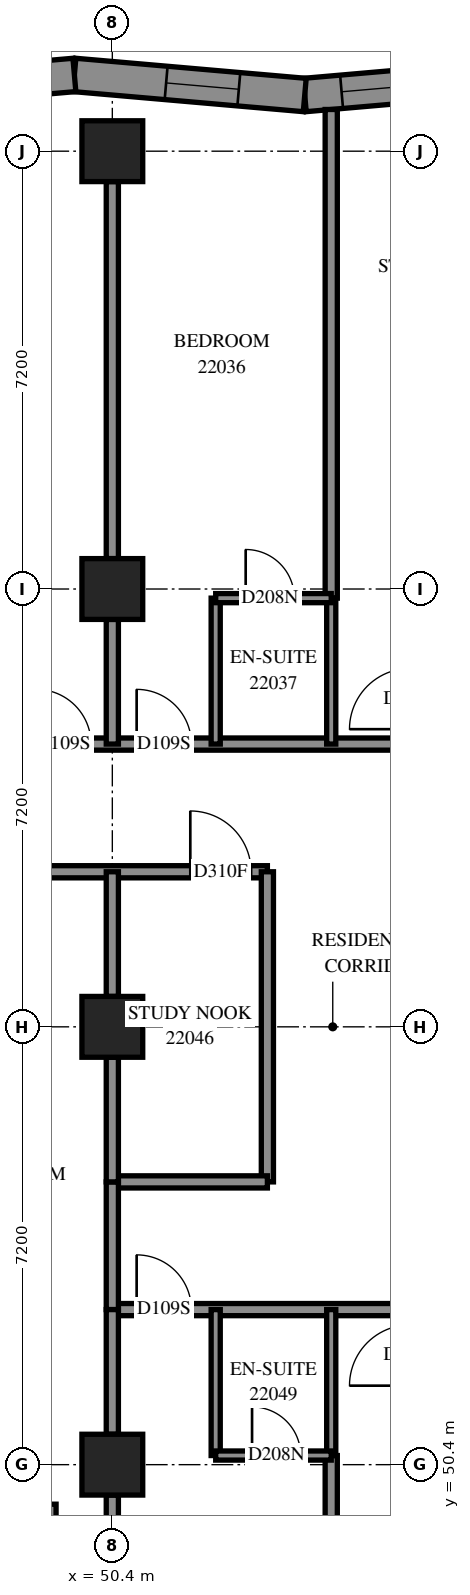
"""IFC4 building model, lengths in metres.
Left out: names, types, materials, properties, quantities, classifications, styles, units other than length and angle.
Written with IfcOpenShell. Run it as: python <this file> out.ifc"""

import sys

from ifc_helpers import new_model, si_unit, direction, frame, frame_2d, origin, origin_2d, place, context, subcontext, project, spatial, polyline, rectangle, outline, extrude, element, fill, save


model = new_model("IFC4")
c1 = context("Model", 3, precision=1e-05, world=origin(), true_north=direction((0.0, 1.0)))
c2 = subcontext(c1, "Body", "Model", "MODEL_VIEW")
j1 = project(units=[si_unit("LENGTHUNIT", "METRE"), si_unit("PLANEANGLEUNIT", "RADIAN")], contexts=[c1])
p1 = place(None, origin())
s1 = spatial("IfcSite", under=j1, at=p1, CompositionType="ELEMENT")
p2 = place(p1, origin())
s2 = spatial("IfcBuilding", under=s1, at=p2, CompositionType="ELEMENT")
p3 = place(p2, frame((0.0, 0.0, 84.6)))
s3 = spatial("IfcBuildingStorey", under=s2, at=p3, CompositionType="ELEMENT", Elevation=84.6)
for number, where, z_axis, x_axis in (
    (1, (50.4, 50.4, 0.0), (0.0, 0.0, 1.0), (1.0, 0.0, 0.0)),
    (2, (50.4, 57.6, 0.0), (0.0, 0.0, 1.0), (1.0, 0.0, 0.0)),
    (3, (50.4, 64.8, 0.0), (0.0, 0.0, 1.0), (1.0, 0.0, 0.0)),
    (4, (50.4, 72.0, 0.0), (0.0, 0.0, 1.0), (1.0, 0.0, 0.0)),
):
    element("IfcColumn", number, at=place(p3, frame(where, z_axis=z_axis, x_axis=x_axis)), inside=s3, PredefinedType="COLUMN", context=c2, shape_type="SweptSolid", body=[
        extrude(rectangle(XDim=1.0, YDim=1.0, at=origin_2d()), origin(), (0.0, 0.0, 1.0), 3.1),
    ])
p4 = place(p3, frame((57.353, 73.254, 0.0), z_axis=(0.0, 0.0, 1.0), x_axis=(-0.9962273538, -0.0867816769, 0.0)))
e5 = element("IfcWall", 5, at=p4, inside=s3, PredefinedType="SOLIDWALL", context=c2, shape_type="SweptSolid", body=[
    extrude(outline(polyline([(-0.024, -0.275), (3.779, -0.275), (3.827, 0.275), (0.024, 0.275), (-0.024, -0.275)])), origin(), (0.0, 0.0, 1.0), 3.1),
])
p5 = place(p4, frame((0.395, 0.0, 0.5)))
e6 = element("IfcOpeningElement", 6, at=p5, cuts=e5, PredefinedType="OPENING", context=c2, shape_type="SweptSolid", body=[
    extrude(rectangle(XDim=1.3, YDim=2.45, at=frame_2d((0.65, 1.225))), frame((0.0, 0.285, 0.0), z_axis=(0.0, -1.0, 0.0), x_axis=(1.0, 0.0, 0.0)), (0.0, 0.0, 1.0), 0.57),
])
p6 = place(p4, frame((1.895, 0.0, 0.5)))
e7 = element("IfcOpeningElement", 7, at=p6, cuts=e5, PredefinedType="OPENING", context=c2, shape_type="SweptSolid", body=[
    extrude(rectangle(XDim=1.3, YDim=2.45, at=frame_2d((0.65, 1.225))), frame((0.0, 0.285, 0.0), z_axis=(0.0, -1.0, 0.0), x_axis=(1.0, 0.0, 0.0)), (0.0, 0.0, 1.0), 0.57),
])
p7 = place(p3, frame((53.564, 72.924, 0.0), z_axis=(0.0, 0.0, 1.0), x_axis=(-0.9962271558, 0.0867839505, 0.0)))
e8 = element("IfcWall", 8, at=p7, inside=s3, PredefinedType="SOLIDWALL", context=c2, shape_type="SweptSolid", body=[
    extrude(outline(polyline([(0.024, -0.275), (3.827, -0.275), (3.779, 0.275), (-0.024, 0.275), (0.024, -0.275)])), origin(), (0.0, 0.0, 1.0), 3.1),
])
p8 = place(p7, frame((1.088, 0.0, 0.5)))
e9 = element("IfcOpeningElement", 9, at=p8, cuts=e8, PredefinedType="OPENING", context=c2, shape_type="SweptSolid", body=[
    extrude(rectangle(XDim=1.2, YDim=2.45, at=frame_2d((0.6, 1.225))), frame((0.0, 0.285, 0.0), z_axis=(0.0, -1.0, 0.0), x_axis=(1.0, 0.0, 0.0)), (0.0, 0.0, 1.0), 0.57),
])
p9 = place(p3, frame((49.776, 73.254, 0.0), z_axis=(0.0, 0.0, 1.0), x_axis=(-0.9962273538, -0.0867816769, 0.0)))
e10 = element("IfcWall", 10, at=p9, inside=s3, PredefinedType="SOLIDWALL", context=c2, shape_type="SweptSolid", body=[
    extrude(outline(polyline([(-0.024, -0.275), (3.779, -0.275), (3.827, 0.275), (0.024, 0.275), (-0.024, -0.275)])), origin(), (0.0, 0.0, 1.0), 3.1),
])
p10 = place(p9, frame((1.006, 0.0, 0.5)))
e11 = element("IfcOpeningElement", 11, at=p10, cuts=e10, PredefinedType="OPENING", context=c2, shape_type="SweptSolid", body=[
    extrude(rectangle(XDim=1.2, YDim=2.45, at=frame_2d((0.6, 1.225))), frame((0.0, 0.285, 0.0), z_axis=(0.0, -1.0, 0.0), x_axis=(1.0, 0.0, 0.0)), (0.0, 0.0, 1.0), 0.57),
])
p11 = place(p3, frame((42.275, 49.475, 0.0), z_axis=(0.0, 0.0, 1.0), x_axis=(1.0, 0.0, 0.0)))
e12 = element("IfcWall", 12, at=p11, inside=s3, PredefinedType="SOLIDWALL", context=c2, shape_type="SweptSolid", body=[
    extrude(outline(polyline([(-0.275, -0.275), (6.925, -0.275), (7.475, 0.275), (0.275, 0.275), (-0.275, -0.275)])), origin(), (0.0, 0.0, 1.0), 3.1),
])
p12 = place(p11, frame((1.325, 0.0, 0.5)))
e13 = element("IfcOpeningElement", 13, at=p12, cuts=e12, PredefinedType="OPENING", context=c2, shape_type="SweptSolid", body=[
    extrude(rectangle(XDim=1.3, YDim=2.45, at=frame_2d((0.65, 1.225))), frame((0.0, 0.285, 0.0), z_axis=(0.0, -1.0, 0.0), x_axis=(1.0, 0.0, 0.0)), (0.0, 0.0, 1.0), 0.57),
])
p13 = place(p11, frame((2.825, 0.0, 0.5)))
e14 = element("IfcOpeningElement", 14, at=p13, cuts=e12, PredefinedType="OPENING", context=c2, shape_type="SweptSolid", body=[
    extrude(rectangle(XDim=1.3, YDim=2.45, at=frame_2d((0.65, 1.225))), frame((0.0, 0.285, 0.0), z_axis=(0.0, -1.0, 0.0), x_axis=(1.0, 0.0, 0.0)), (0.0, 0.0, 1.0), 0.57),
])
p14 = place(p11, frame((5.162, 0.0, 0.5)))
e15 = element("IfcOpeningElement", 15, at=p14, cuts=e12, PredefinedType="OPENING", context=c2, shape_type="SweptSolid", body=[
    extrude(rectangle(XDim=1.2, YDim=2.45, at=frame_2d((0.6, 1.225))), frame((0.0, 0.285, 0.0), z_axis=(0.0, -1.0, 0.0), x_axis=(1.0, 0.0, 0.0)), (0.0, 0.0, 1.0), 0.57),
])
p15 = place(p3, frame((49.475, 49.475, 0.0), z_axis=(0.0, 0.0, 1.0), x_axis=(0.0, -1.0, 0.0)))
e16 = element("IfcWall", 16, at=p15, inside=s3, PredefinedType="SOLIDWALL", context=c2, shape_type="SweptSolid", body=[
    extrude(outline(polyline([(0.275, -0.275), (8.405, -0.275), (7.686, 0.275), (-0.275, 0.275), (0.275, -0.275)])), origin(), (0.0, 0.0, 1.0), 3.1),
])
p16 = place(p15, frame((3.325, 0.0, 0.5)))
e17 = element("IfcOpeningElement", 17, at=p16, cuts=e16, PredefinedType="OPENING", context=c2, shape_type="SweptSolid", body=[
    extrude(rectangle(XDim=1.3, YDim=2.45, at=frame_2d((0.65, 1.225))), frame((0.0, 0.285, 0.0), z_axis=(0.0, -1.0, 0.0), x_axis=(1.0, 0.0, 0.0)), (0.0, 0.0, 1.0), 0.57),
])
p17 = place(p15, frame((4.825, 0.0, 0.5)))
e18 = element("IfcOpeningElement", 18, at=p17, cuts=e16, PredefinedType="OPENING", context=c2, shape_type="SweptSolid", body=[
    extrude(rectangle(XDim=1.3, YDim=2.45, at=frame_2d((0.65, 1.225))), frame((0.0, 0.285, 0.0), z_axis=(0.0, -1.0, 0.0), x_axis=(1.0, 0.0, 0.0)), (0.0, 0.0, 1.0), 0.57),
])
p18 = place(p15, frame((0.838, 0.0, 0.5)))
e19 = element("IfcOpeningElement", 19, at=p18, cuts=e16, PredefinedType="OPENING", context=c2, shape_type="SweptSolid", body=[
    extrude(rectangle(XDim=1.2, YDim=2.45, at=frame_2d((0.6, 1.225))), frame((0.0, 0.285, 0.0), z_axis=(0.0, -1.0, 0.0), x_axis=(1.0, 0.0, 0.0)), (0.0, 0.0, 1.0), 0.57),
])
p19 = place(p3, frame((28.8, 60.15, 0.0), z_axis=(0.0, 0.0, 1.0), x_axis=(1.0, 0.0, 0.0)))
e20 = element("IfcWall", 20, at=p19, inside=s3, PredefinedType="PARTITIONING", context=c2, shape_type="SweptSolid", body=[
    extrude(rectangle(XDim=24.15, YDim=0.2, at=frame_2d((12.075, 0.0))), origin(), (0.0, 0.0, 1.0), 3.1),
])
p20 = place(p19, frame((11.325, 0.0, 0.0)))
e21 = element("IfcOpeningElement", 21, at=p20, cuts=e20, PredefinedType="OPENING", context=c2, shape_type="SweptSolid", body=[
    extrude(rectangle(XDim=1.0, YDim=2.1, at=frame_2d((0.5, 1.05))), frame((0.0, 0.11, 0.0), z_axis=(0.0, -1.0, 0.0), x_axis=(1.0, 0.0, 0.0)), (0.0, 0.0, 1.0), 0.22),
])
p21 = place(p19, frame((14.8, 0.0, 0.0)))
e22 = element("IfcOpeningElement", 22, at=p21, cuts=e20, PredefinedType="OPENING", context=c2, shape_type="SweptSolid", body=[
    extrude(rectangle(XDim=0.9, YDim=2.1, at=frame_2d((0.45, 1.05))), frame((0.0, 0.11, 0.0), z_axis=(0.0, -1.0, 0.0), x_axis=(1.0, 0.0, 0.0)), (0.0, 0.0, 1.0), 0.22),
])
p22 = place(p19, frame((18.508, 0.0, 0.0)))
e23 = element("IfcOpeningElement", 23, at=p22, cuts=e20, PredefinedType="OPENING", context=c2, shape_type="SweptSolid", body=[
    extrude(rectangle(XDim=1.0, YDim=2.1, at=frame_2d((0.5, 1.05))), frame((0.0, 0.11, 0.0), z_axis=(0.0, -1.0, 0.0), x_axis=(1.0, 0.0, 0.0)), (0.0, 0.0, 1.0), 0.22),
])
p23 = place(p19, frame((22.882, 0.0, 0.0)))
e24 = element("IfcOpeningElement", 24, at=p23, cuts=e20, PredefinedType="OPENING", context=c2, shape_type="SweptSolid", body=[
    extrude(rectangle(XDim=1.0, YDim=2.1, at=frame_2d((0.5, 1.05))), frame((0.0, 0.11, 0.0), z_axis=(0.0, -1.0, 0.0), x_axis=(1.0, 0.0, 0.0)), (0.0, 0.0, 1.0), 0.22),
])
p24 = place(p3, frame((33.45, 62.25, 0.0), z_axis=(0.0, 0.0, 1.0), x_axis=(1.0, 0.0, 0.0)))
e25 = element("IfcWall", 25, at=p24, inside=s3, PredefinedType="PARTITIONING", context=c2, shape_type="SweptSolid", body=[
    extrude(rectangle(XDim=21.85, YDim=0.2, at=frame_2d((10.925, 0.0))), origin(), (0.0, 0.0, 1.0), 3.1),
])
p25 = place(p24, frame((0.144, 0.0, 0.0)))
e26 = element("IfcOpeningElement", 26, at=p25, cuts=e25, PredefinedType="OPENING", context=c2, shape_type="SweptSolid", body=[
    extrude(rectangle(XDim=1.0, YDim=2.1, at=frame_2d((0.5, 1.05))), frame((0.0, 0.11, 0.0), z_axis=(0.0, -1.0, 0.0), x_axis=(1.0, 0.0, 0.0)), (0.0, 0.0, 1.0), 0.22),
])
p26 = place(p24, frame((2.95, 0.0, 0.0)))
e27 = element("IfcOpeningElement", 27, at=p26, cuts=e25, PredefinedType="OPENING", context=c2, shape_type="SweptSolid", body=[
    extrude(rectangle(XDim=0.9, YDim=2.1, at=frame_2d((0.45, 1.05))), frame((0.0, 0.11, 0.0), z_axis=(0.0, -1.0, 0.0), x_axis=(1.0, 0.0, 0.0)), (0.0, 0.0, 1.0), 0.22),
])
p27 = place(p24, frame((8.407, 0.0, 0.0)))
e28 = element("IfcOpeningElement", 28, at=p27, cuts=e25, PredefinedType="OPENING", context=c2, shape_type="SweptSolid", body=[
    extrude(rectangle(XDim=0.9, YDim=2.1, at=frame_2d((0.45, 1.05))), frame((0.0, 0.11, 0.0), z_axis=(0.0, -1.0, 0.0), x_axis=(1.0, 0.0, 0.0)), (0.0, 0.0, 1.0), 0.22),
])
p28 = place(p24, frame((15.7, 0.0, 0.0)))
e29 = element("IfcOpeningElement", 29, at=p28, cuts=e25, PredefinedType="OPENING", context=c2, shape_type="SweptSolid", body=[
    extrude(rectangle(XDim=0.9, YDim=2.1, at=frame_2d((0.45, 1.05))), frame((0.0, 0.11, 0.0), z_axis=(0.0, -1.0, 0.0), x_axis=(1.0, 0.0, 0.0)), (0.0, 0.0, 1.0), 0.22),
])
p29 = place(p24, frame((17.35, 0.0, 0.0)))
e30 = element("IfcOpeningElement", 30, at=p29, cuts=e25, PredefinedType="OPENING", context=c2, shape_type="SweptSolid", body=[
    extrude(rectangle(XDim=0.9, YDim=2.1, at=frame_2d((0.45, 1.05))), frame((0.0, 0.11, 0.0), z_axis=(0.0, -1.0, 0.0), x_axis=(1.0, 0.0, 0.0)), (0.0, 0.0, 1.0), 0.22),
])
p30 = place(p3, frame((54.0, 42.42, 0.0), z_axis=(0.0, 0.0, 1.0), x_axis=(0.0, 1.0, 0.0)))
e31 = element("IfcWall", 31, at=p30, inside=s3, PredefinedType="PARTITIONING", context=c2, shape_type="SweptSolid", body=[
    extrude(rectangle(XDim=8.13, YDim=0.2, at=frame_2d((4.065, 0.0))), origin(), (0.0, 0.0, 1.0), 3.1),
])
p31 = place(p3, frame((54.0, 64.65, 0.0), z_axis=(0.0, 0.0, 1.0), x_axis=(0.0, 1.0, 0.0)))
e32 = element("IfcWall", 32, at=p31, inside=s3, PredefinedType="PARTITIONING", context=c2, shape_type="SweptSolid", body=[
    extrude(rectangle(XDim=8.036, YDim=0.2, at=frame_2d((4.018, 0.0))), origin(), (0.0, 0.0, 1.0), 3.1),
])
p32 = place(p3, frame((50.4, 65.3, 0.0), z_axis=(0.0, 0.0, 1.0), x_axis=(0.0, 1.0, 0.0)))
e33 = element("IfcWall", 33, at=p32, inside=s3, PredefinedType="PARTITIONING", context=c2, shape_type="SweptSolid", body=[
    extrude(rectangle(XDim=6.2, YDim=0.2, at=frame_2d((3.1, 0.0))), origin(), (0.0, 0.0, 1.0), 3.1),
])
p33 = place(p3, frame((50.4, 43.7, 0.0), z_axis=(0.0, 0.0, 1.0), x_axis=(0.0, 1.0, 0.0)))
e34 = element("IfcWall", 34, at=p33, inside=s3, PredefinedType="PARTITIONING", context=c2, shape_type="SweptSolid", body=[
    extrude(rectangle(XDim=6.2, YDim=0.2, at=frame_2d((3.1, 0.0))), origin(), (0.0, 0.0, 1.0), 2.6),
])
p34 = place(p3, frame((52.95, 55.05, 0.0), z_axis=(0.0, 0.0, 1.0), x_axis=(0.0, 1.0, 0.0)))
e35 = element("IfcWall", 35, at=p34, inside=s3, PredefinedType="PARTITIONING", context=c2, shape_type="SweptSolid", body=[
    extrude(rectangle(XDim=5.1, YDim=0.2, at=frame_2d((2.55, 0.0))), origin(), (0.0, 0.0, 1.0), 3.1),
])
p35 = place(p3, frame((50.4, 52.95, 0.0), z_axis=(0.0, 0.0, 1.0), x_axis=(1.0, 0.0, 0.0)))
e36 = element("IfcWall", 36, at=p35, inside=s3, PredefinedType="PARTITIONING", context=c2, shape_type="SweptSolid", body=[
    extrude(rectangle(XDim=4.9, YDim=0.2, at=frame_2d((2.45, 0.0))), origin(), (0.0, 0.0, 1.0), 3.1),
])
p36 = place(p35, frame((0.4, 0.0, 0.0)))
e37 = element("IfcOpeningElement", 37, at=p36, cuts=e36, PredefinedType="OPENING", context=c2, shape_type="SweptSolid", body=[
    extrude(rectangle(XDim=0.9, YDim=2.1, at=frame_2d((0.45, 1.05))), frame((0.0, 0.11, 0.0), z_axis=(0.0, -1.0, 0.0), x_axis=(1.0, 0.0, 0.0)), (0.0, 0.0, 1.0), 0.22),
])
p37 = place(p3, frame((50.4, 55.05, 0.0), z_axis=(0.0, 0.0, 1.0), x_axis=(1.0, 0.0, 0.0)))
e38 = element("IfcWall", 38, at=p37, inside=s3, PredefinedType="PARTITIONING", context=c2, shape_type="SweptSolid", body=[
    extrude(rectangle(XDim=2.55, YDim=0.2, at=frame_2d((1.275, 0.0))), origin(), (0.0, 0.0, 1.0), 3.1),
])
for number, where, z_axis, x_axis in (
    (39, (52.1, 50.55, 0.0), (0.0, 0.0, 1.0), (0.0, 1.0, 0.0)),
    (40, (52.1, 62.25, 0.0), (0.0, 0.0, 1.0), (0.0, 1.0, 0.0)),
    (41, (54.0, 50.55, 0.0), (0.0, 0.0, 1.0), (0.0, 1.0, 0.0)),
    (42, (54.0, 62.25, 0.0), (0.0, 0.0, 1.0), (0.0, 1.0, 0.0)),
):
    element("IfcWall", number, at=place(p3, frame(where, z_axis=z_axis, x_axis=x_axis)), inside=s3, PredefinedType="PARTITIONING", context=c2, shape_type="SweptSolid", body=[
        extrude(rectangle(XDim=2.4, YDim=0.15, at=frame_2d((1.2, 0.0))), origin(), (0.0, 0.0, 1.0), 3.1),
    ])
p38 = place(p3, frame((50.4, 52.95, 0.0), z_axis=(0.0, 0.0, 1.0), x_axis=(0.0, 1.0, 0.0)))
e43 = element("IfcWall", 43, at=p38, inside=s3, PredefinedType="PARTITIONING", context=c2, shape_type="SweptSolid", body=[
    extrude(rectangle(XDim=2.1, YDim=0.2, at=frame_2d((1.05, 0.0))), origin(), (0.0, 0.0, 1.0), 3.1),
])
for number, where, z_axis, x_axis in (
    (44, (50.4, 50.9, 0.0), (0.0, 0.0, 1.0), (0.0, 1.0, 0.0)),
    (45, (50.4, 55.05, 0.0), (0.0, 0.0, 1.0), (0.0, 1.0, 0.0)),
    (46, (50.4, 58.1, 0.0), (0.0, 0.0, 1.0), (0.0, 1.0, 0.0)),
    (47, (50.4, 62.25, 0.0), (0.0, 0.0, 1.0), (0.0, 1.0, 0.0)),
):
    element("IfcWall", number, at=place(p3, frame(where, z_axis=z_axis, x_axis=x_axis)), inside=s3, PredefinedType="PARTITIONING", context=c2, shape_type="SweptSolid", body=[
        extrude(rectangle(XDim=2.05, YDim=0.2, at=frame_2d((1.025, 0.0))), origin(), (0.0, 0.0, 1.0), 3.1),
    ])
p39 = place(p3, frame((52.1, 64.65, 0.0), z_axis=(0.0, 0.0, 1.0), x_axis=(1.0, 0.0, 0.0)))
e48 = element("IfcWall", 48, at=p39, inside=s3, PredefinedType="PARTITIONING", context=c2, shape_type="SweptSolid", body=[
    extrude(rectangle(XDim=1.9, YDim=0.15, at=frame_2d((0.95, 0.0))), origin(), (0.0, 0.0, 1.0), 3.1),
])
p40 = place(p39, frame((0.493, 0.0, 0.0)))
e49 = element("IfcOpeningElement", 49, at=p40, cuts=e48, PredefinedType="OPENING", context=c2, shape_type="SweptSolid", body=[
    extrude(rectangle(XDim=0.8, YDim=2.1, at=frame_2d((0.4, 1.05))), frame((0.0, 0.085, 0.0), z_axis=(0.0, -1.0, 0.0), x_axis=(1.0, 0.0, 0.0)), (0.0, 0.0, 1.0), 0.17),
])
p41 = place(p3, frame((52.1, 50.55, 0.0), z_axis=(0.0, 0.0, 1.0), x_axis=(1.0, 0.0, 0.0)))
e50 = element("IfcWall", 50, at=p41, inside=s3, PredefinedType="PARTITIONING", context=c2, shape_type="SweptSolid", body=[
    extrude(rectangle(XDim=1.9, YDim=0.15, at=frame_2d((0.95, 0.0))), origin(), (0.0, 0.0, 1.0), 3.1),
])
p42 = place(p41, frame((0.598, 0.0, 0.0)))
e51 = element("IfcOpeningElement", 51, at=p42, cuts=e50, PredefinedType="OPENING", context=c2, shape_type="SweptSolid", body=[
    extrude(rectangle(XDim=0.8, YDim=2.1, at=frame_2d((0.4, 1.05))), frame((0.0, 0.085, 0.0), z_axis=(0.0, -1.0, 0.0), x_axis=(1.0, 0.0, 0.0)), (0.0, 0.0, 1.0), 0.17),
])
p43 = place(p6, origin())
e52 = element("IfcWindow", 52, at=p43, inside=s3, PartitioningType="SINGLE_PANEL", PredefinedType="WINDOW", context=c2, shape_type="SweptSolid", body=[
    extrude(rectangle(XDim=1.3, YDim=2.45, at=frame_2d((0.65, 1.225))), frame((0.0, 0.155, 0.0), z_axis=(0.0, -1.0, 0.0), x_axis=(1.0, 0.0, 0.0)), (0.0, 0.0, 1.0), 0.06),
])
fill(e7, e52)
p44 = place(p8, origin())
e53 = element("IfcWindow", 53, at=p44, inside=s3, PartitioningType="SINGLE_PANEL", PredefinedType="WINDOW", context=c2, shape_type="SweptSolid", body=[
    extrude(rectangle(XDim=1.2, YDim=2.45, at=frame_2d((0.6, 1.225))), frame((0.0, 0.155, 0.0), z_axis=(0.0, -1.0, 0.0), x_axis=(1.0, 0.0, 0.0)), (0.0, 0.0, 1.0), 0.06),
])
fill(e9, e53)
p45 = place(p28, origin())
e54 = element("IfcDoor", 54, at=p45, inside=s3, OperationType="SINGLE_SWING_LEFT", PredefinedType="DOOR", context=c2, shape_type="SweptSolid", body=[
    extrude(rectangle(XDim=0.9, YDim=2.1, at=frame_2d((0.45, 1.05))), frame((0.0, 0.025, 0.0), z_axis=(0.0, -1.0, 0.0), x_axis=(1.0, 0.0, 0.0)), (0.0, 0.0, 1.0), 0.05),
])
fill(e29, e54)
p46 = place(p29, origin())
e55 = element("IfcDoor", 55, at=p46, inside=s3, OperationType="SINGLE_SWING_RIGHT", PredefinedType="DOOR", context=c2, shape_type="SweptSolid", body=[
    extrude(rectangle(XDim=0.9, YDim=2.1, at=frame_2d((0.45, 1.05))), frame((0.0, 0.025, 0.0), z_axis=(0.0, -1.0, 0.0), x_axis=(1.0, 0.0, 0.0)), (0.0, 0.0, 1.0), 0.05),
])
fill(e30, e55)
p47 = place(p40, origin())
e56 = element("IfcDoor", 56, at=p47, inside=s3, OperationType="SINGLE_SWING_RIGHT", PredefinedType="DOOR", context=c2, shape_type="SweptSolid", body=[
    extrude(rectangle(XDim=0.8, YDim=2.1, at=frame_2d((0.4, 1.05))), frame((0.0, 0.025, 0.0), z_axis=(0.0, -1.0, 0.0), x_axis=(1.0, 0.0, 0.0)), (0.0, 0.0, 1.0), 0.05),
])
fill(e49, e56)
p48 = place(p23, origin())
e57 = element("IfcDoor", 57, at=p48, inside=s3, OperationType="SINGLE_SWING_LEFT", PredefinedType="DOOR", context=c2, shape_type="SweptSolid", body=[
    extrude(rectangle(XDim=1.0, YDim=2.1, at=frame_2d((0.5, 1.05))), frame((0.0, 0.025, 0.0), z_axis=(0.0, -1.0, 0.0), x_axis=(1.0, 0.0, 0.0)), (0.0, 0.0, 1.0), 0.05),
])
fill(e24, e57)
p49 = place(p36, origin())
e58 = element("IfcDoor", 58, at=p49, inside=s3, OperationType="SINGLE_SWING_LEFT", PredefinedType="DOOR", context=c2, shape_type="SweptSolid", body=[
    extrude(rectangle(XDim=0.9, YDim=2.1, at=frame_2d((0.45, 1.05))), frame((0.0, 0.025, 0.0), z_axis=(0.0, -1.0, 0.0), x_axis=(1.0, 0.0, 0.0)), (0.0, 0.0, 1.0), 0.05),
])
fill(e37, e58)
p50 = place(p42, origin())
e59 = element("IfcDoor", 59, at=p50, inside=s3, OperationType="SINGLE_SWING_RIGHT", PredefinedType="DOOR", context=c2, shape_type="SweptSolid", body=[
    extrude(rectangle(XDim=0.8, YDim=2.1, at=frame_2d((0.4, 1.05))), frame((0.0, 0.025, 0.0), z_axis=(0.0, -1.0, 0.0), x_axis=(1.0, 0.0, 0.0)), (0.0, 0.0, 1.0), 0.05),
])
fill(e51, e59)
save(model, sys.argv[1])
